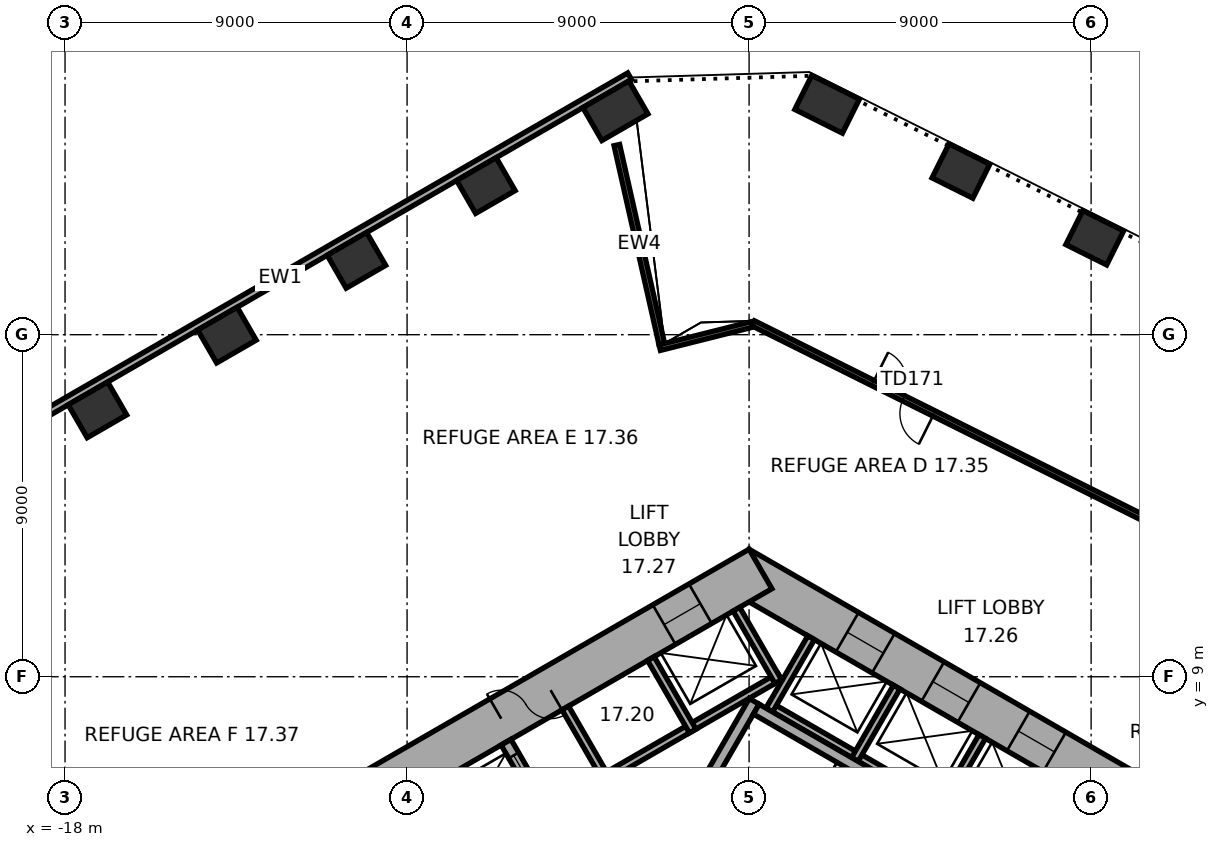
"""IFC4 building model, lengths in metres.
Left out: names, types, materials, properties, quantities, classifications, styles, units other than length and angle.
Written with IfcOpenShell. Run it as: python <this file> out.ifc"""

import sys

from ifc_helpers import new_model, si_unit, direction, frame, frame_2d, origin, origin_2d, place, context, subcontext, project, spatial, rectangle, extrude, element, fill, save


model = new_model("IFC4")
c1 = context("Model", 3, precision=1e-05, world=origin(), true_north=direction((0.0, 1.0)))
c2 = subcontext(c1, "Body", "Model", "MODEL_VIEW")
j1 = project(units=[si_unit("LENGTHUNIT", "METRE"), si_unit("PLANEANGLEUNIT", "RADIAN")], contexts=[c1])
p1 = place(None, origin())
s1 = spatial("IfcSite", under=j1, at=p1, CompositionType="ELEMENT")
p2 = place(p1, origin())
s2 = spatial("IfcBuilding", under=s1, at=p2, CompositionType="ELEMENT")
p3 = place(p2, frame((0.0, 0.0, 77.0)))
s3 = spatial("IfcBuildingStorey", under=s2, at=p3, CompositionType="ELEMENT", Elevation=77.0)
for number, where, z_axis, x_axis in (
    (1, (9.095, 20.551, 0.0), (0.0, 0.0, 1.0), (-0.895, 0.446, 0.0)),
    (2, (5.574, 22.306, 0.0), (0.0, 0.0, 1.0), (-0.895, 0.446, 0.0)),
):
    element("IfcColumn", number, at=place(p3, frame(where, z_axis=z_axis, x_axis=x_axis)), inside=s3, PredefinedType="COLUMN", context=c2, shape_type="SweptSolid", body=[
        extrude(rectangle(XDim=1.2, YDim=1.0, at=origin_2d()), origin(), (0.0, 0.0, 1.0), 6.6),
    ])
for number, where, z_axis, x_axis in (
    (3, (2.053, 24.062, 0.0), (0.0, 0.0, 1.0), (-0.895, 0.446, 0.0)),
    (4, (-3.518, 23.892, 0.0), (0.0, 0.0, 1.0), (-0.866, -0.5, 0.0)),
):
    element("IfcColumn", number, at=place(p3, frame(where, z_axis=z_axis, x_axis=x_axis)), inside=s3, PredefinedType="COLUMN", context=c2, shape_type="SweptSolid", body=[
        extrude(rectangle(XDim=1.4, YDim=1.0, at=origin_2d()), origin(), (0.0, 0.0, 1.0), 6.6),
    ])
for number, where, z_axis, x_axis in (
    (5, (-6.926, 21.925, 0.0), (0.0, 0.0, 1.0), (-0.866, -0.5, 0.0)),
    (6, (-10.333, 19.957, 0.0), (0.0, 0.0, 1.0), (-0.866, -0.5, 0.0)),
    (7, (-13.74, 17.99, 0.0), (0.0, 0.0, 1.0), (-0.866, -0.5, 0.0)),
    (8, (-17.148, 16.023, 0.0), (0.0, 0.0, 1.0), (-0.866, -0.5, 0.0)),
):
    element("IfcColumn", number, at=place(p3, frame(where, z_axis=z_axis, x_axis=x_axis)), inside=s3, PredefinedType="COLUMN", context=c2, shape_type="SweptSolid", body=[
        extrude(rectangle(XDim=1.2, YDim=1.0, at=origin_2d()), origin(), (0.0, 0.0, 1.0), 6.6),
    ])
p4 = place(p3, frame((10.4, 5.658, 0.0), z_axis=(0.0, 0.0, 1.0), x_axis=(-0.866021384402, 0.500006961711, 0.0)))
e9 = element("IfcWall", 9, at=p4, inside=s3, PredefinedType="SHEAR", context=c2, shape_type="SweptSolid", body=[
    extrude(rectangle(XDim=12.355, YDim=1.2, at=frame_2d((6.178, 0.0))), origin(), (0.0, 0.0, 1.0), 6.6),
])
p5 = place(p4, frame((2.728, 0.0, 0.0)))
e10 = element("IfcOpeningElement", 10, at=p5, cuts=e9, PredefinedType="OPENING", context=c2, shape_type="SweptSolid", body=[
    extrude(rectangle(XDim=1.1, YDim=2.1, at=frame_2d((0.55, 1.05))), frame((0.0, 0.61, 0.0), z_axis=(0.0, -1.0, 0.0), x_axis=(1.0, 0.0, 0.0)), (0.0, 0.0, 1.0), 1.22),
])
p6 = place(p4, frame((5.328, 0.0, 0.0)))
e11 = element("IfcOpeningElement", 11, at=p6, cuts=e9, PredefinedType="OPENING", context=c2, shape_type="SweptSolid", body=[
    extrude(rectangle(XDim=1.1, YDim=2.1, at=frame_2d((0.55, 1.05))), frame((0.0, 0.61, 0.0), z_axis=(0.0, -1.0, 0.0), x_axis=(1.0, 0.0, 0.0)), (0.0, 0.0, 1.0), 1.22),
])
p7 = place(p4, frame((7.928, 0.0, 0.0)))
e12 = element("IfcOpeningElement", 12, at=p7, cuts=e9, PredefinedType="OPENING", context=c2, shape_type="SweptSolid", body=[
    extrude(rectangle(XDim=1.1, YDim=2.1, at=frame_2d((0.55, 1.05))), frame((0.0, 0.61, 0.0), z_axis=(0.0, -1.0, 0.0), x_axis=(1.0, 0.0, 0.0)), (0.0, 0.0, 1.0), 1.22),
])
p8 = place(p3, frame((0.3, 11.836, 0.0), z_axis=(0.0, 0.0, 1.0), x_axis=(-0.866021384402, -0.500006961711, 0.0)))
e13 = element("IfcWall", 13, at=p8, inside=s3, PredefinedType="SHEAR", context=c2, shape_type="SweptSolid", body=[
    extrude(rectangle(XDim=12.355, YDim=1.2, at=frame_2d((6.178, 0.0))), origin(), (0.0, 0.0, 1.0), 6.6),
])
p9 = place(p8, frame((6.378, 0.0, 0.0)))
e14 = element("IfcOpeningElement", 14, at=p9, cuts=e13, PredefinedType="OPENING", context=c2, shape_type="SweptSolid", body=[
    extrude(rectangle(XDim=1.5, YDim=2.1, at=frame_2d((0.75, 1.05))), frame((0.0, 0.61, 0.0), z_axis=(0.0, -1.0, 0.0), x_axis=(1.0, 0.0, 0.0)), (0.0, 0.0, 1.0), 1.22),
])
p10 = place(p8, frame((1.828, 0.0, 0.0)))
e15 = element("IfcOpeningElement", 15, at=p10, cuts=e13, PredefinedType="OPENING", context=c2, shape_type="SweptSolid", body=[
    extrude(rectangle(XDim=1.1, YDim=2.1, at=frame_2d((0.55, 1.05))), frame((0.0, 0.61, 0.0), z_axis=(0.0, -1.0, 0.0), x_axis=(1.0, 0.0, 0.0)), (0.0, 0.0, 1.0), 1.22),
])
p11 = place(p3, frame((-3.144, 24.801, 0.0), z_axis=(0.0, 0.0, 1.0), x_axis=(-0.866028031259, -0.499995449053, 0.0)))
e16 = element("IfcWall", 16, at=p11, inside=s3, PredefinedType="STANDARD", context=c2, shape_type="SweptSolid", body=[
    extrude(rectangle(XDim=21.237, YDim=0.2, at=frame_2d((10.619, 0.0))), origin(), (0.0, 0.0, 1.0), 6.6),
])
p12 = place(p3, frame((-3.481, 22.99, 0.0), z_axis=(0.0, 0.0, 1.0), x_axis=(0.220457909633, -0.975396488655, 0.0)))
e17 = element("IfcWall", 17, at=p12, inside=s3, PredefinedType="STANDARD", context=c2, shape_type="SweptSolid", body=[
    extrude(rectangle(XDim=5.362, YDim=0.15, at=frame_2d((2.681, 0.0))), origin(), (0.0, 0.0, 1.0), 2.6),
])
p13 = place(p3, frame((-2.351, 17.659, 0.0), z_axis=(0.0, 0.0, 1.0), x_axis=(0.969814051176, 0.243845660495, 0.0)))
e18 = element("IfcWall", 18, at=p13, inside=s3, PredefinedType="STANDARD", context=c2, shape_type="SweptSolid", body=[
    extrude(rectangle(XDim=2.499, YDim=0.15, at=frame_2d((1.25, 0.0))), origin(), (0.0, 0.0, 1.0), 2.6),
])
p14 = place(p3, frame((0.113, 18.297, 0.0), z_axis=(0.0, 0.0, 1.0), x_axis=(0.894932628477, -0.446201289204, 0.0)))
e19 = element("IfcWall", 19, at=p14, inside=s3, PredefinedType="STANDARD", context=c2, shape_type="SweptSolid", body=[
    extrude(rectangle(XDim=17.659, YDim=0.15, at=frame_2d((8.83, 0.0))), origin(), (0.0, 0.0, 1.0), 2.6),
])
p15 = place(p14, frame((3.515, 0.0, 0.0)))
e20 = element("IfcOpeningElement", 20, at=p15, cuts=e19, PredefinedType="OPENING", context=c2, shape_type="SweptSolid", body=[
    extrude(rectangle(XDim=1.8, YDim=2.4, at=frame_2d((0.9, 1.2))), frame((0.0, 0.085, 0.0), z_axis=(0.0, -1.0, 0.0), x_axis=(1.0, 0.0, 0.0)), (0.0, 0.0, 1.0), 0.17),
])
p16 = place(p14, frame((12.344, 0.0, 0.0)))
e21 = element("IfcOpeningElement", 21, at=p16, cuts=e19, PredefinedType="OPENING", context=c2, shape_type="SweptSolid", body=[
    extrude(rectangle(XDim=1.8, YDim=2.4, at=frame_2d((0.9, 1.2))), frame((0.0, 0.085, 0.0), z_axis=(0.0, -1.0, 0.0), x_axis=(1.0, 0.0, 0.0)), (0.0, 0.0, 1.0), 0.17),
])
p17 = place(p3, frame((7.424, 4.259, 0.0), z_axis=(0.0, 0.0, 1.0), x_axis=(-0.866026010844, 0.49999894854, 0.0)))
e22 = element("IfcWall", 22, at=p17, inside=s3, PredefinedType="PARTITIONING", context=c2, shape_type="SweptSolid", body=[
    extrude(rectangle(XDim=8.0, YDim=0.2, at=frame_2d((4.0, 0.0))), origin(), (0.0, 0.0, 1.0), 6.35),
])
for number, where, z_axis, x_axis in (
    (23, (5.036, 5.522, 0.0), (0.0, 0.0, 1.0), (0.5, 0.866, 0.0)),
    (24, (2.784, 6.822, 0.0), (0.0, 0.0, 1.0), (0.5, 0.866, 0.0)),
    (25, (0.532, 8.122, 0.0), (0.0, 0.0, 1.0), (0.5, 0.866, 0.0)),
):
    element("IfcWall", number, at=place(p3, frame(where, z_axis=z_axis, x_axis=x_axis)), inside=s3, PredefinedType="PARTITIONING", context=c2, shape_type="SweptSolid", body=[
        extrude(rectangle(XDim=2.2, YDim=0.2, at=frame_2d((1.1, 0.0))), origin(), (0.0, 0.0, 1.0), 6.35),
    ])
p18 = place(p3, frame((0.803, 9.009, 0.0), z_axis=(0.0, 0.0, 1.0), x_axis=(-0.866028230842, -0.499995103361, 0.0)))
e26 = element("IfcWall", 26, at=p18, inside=s3, PredefinedType="PARTITIONING", context=c2, shape_type="SweptSolid", body=[
    extrude(rectangle(XDim=5.4, YDim=0.2, at=frame_2d((2.7, 0.0))), origin(), (0.0, 0.0, 1.0), 6.35),
])
p19 = place(p3, frame((0.767, 8.872, 0.0), z_axis=(0.0, 0.0, 1.0), x_axis=(-0.499994660107, 0.866028486751, 0.0)))
e27 = element("IfcWall", 27, at=p19, inside=s3, PredefinedType="PARTITIONING", context=c2, shape_type="SweptSolid", body=[
    extrude(rectangle(XDim=2.2, YDim=0.2, at=frame_2d((1.1, 0.0))), origin(), (0.0, 0.0, 1.0), 6.35),
])
for number, where, z_axis, x_axis in (
    (28, (-1.485, 7.572, 0.0), (0.0, 0.0, 1.0), (-0.5, 0.866, 0.0)),
    (29, (-3.737, 6.272, 0.0), (0.0, 0.0, 1.0), (-0.5, 0.866, 0.0)),
):
    element("IfcWall", number, at=place(p3, frame(where, z_axis=z_axis, x_axis=x_axis)), inside=s3, PredefinedType="PARTITIONING", context=c2, shape_type="SweptSolid", body=[
        extrude(rectangle(XDim=2.2, YDim=0.2, at=frame_2d((1.1, 0.0))), origin(), (0.0, 0.0, 1.0), 6.35),
    ])
p20 = place(p3, frame((-2.216, 4.282, 0.0), z_axis=(0.0, 0.0, 1.0), x_axis=(0.499977259774, 0.866038532462, 0.0)))
e30 = element("IfcWall", 30, at=p20, inside=s3, PredefinedType="SHEAR", context=c2, shape_type="SweptSolid", body=[
    extrude(rectangle(XDim=4.7, YDim=0.3, at=frame_2d((2.35, 0.0))), origin(), (0.0, 0.0, 1.0), 6.35),
])
p21 = place(p3, frame((6.303, 4.617, 0.0), z_axis=(0.0, 0.0, 1.0), x_axis=(-0.866027801685, 0.499995846692, 0.0)))
e31 = element("IfcWall", 31, at=p21, inside=s3, PredefinedType="SHEAR", context=c2, shape_type="SweptSolid", body=[
    extrude(rectangle(XDim=7.06, YDim=0.3, at=frame_2d((3.53, 0.0))), origin(), (0.0, 0.0, 1.0), 6.35),
])
p22 = place(p3, frame((-5.295, 5.372, 0.0), z_axis=(0.0, 0.0, 1.0), x_axis=(-0.500077893725, 0.86598042715, 0.0)))
e32 = element("IfcWall", 32, at=p22, inside=s3, PredefinedType="SHEAR", context=c2, shape_type="SweptSolid", body=[
    extrude(rectangle(XDim=2.2, YDim=0.3, at=frame_2d((1.1, 0.0))), origin(), (0.0, 0.0, 1.0), 6.35),
])
p23 = place(p22, frame((0.7, 0.0, 0.0)))
e33 = element("IfcOpeningElement", 33, at=p23, cuts=e32, PredefinedType="OPENING", context=c2, shape_type="SweptSolid", body=[
    extrude(rectangle(XDim=1.1, YDim=2.1, at=frame_2d((0.55, 1.05))), frame((0.0, 0.16, 0.0), z_axis=(0.0, -1.0, 0.0), x_axis=(1.0, 0.0, 0.0)), (0.0, 0.0, 1.0), 0.32),
])
p24 = place(p15, origin())
e34 = element("IfcDoor", 34, at=p24, inside=s3, OperationType="DOUBLE_DOOR_DOUBLE_SWING", PredefinedType="DOOR", context=c2, shape_type="SweptSolid", body=[
    extrude(rectangle(XDim=1.8, YDim=2.4, at=frame_2d((0.9, 1.2))), frame((0.0, 0.025, 0.0), z_axis=(0.0, -1.0, 0.0), x_axis=(1.0, 0.0, 0.0)), (0.0, 0.0, 1.0), 0.05),
])
fill(e20, e34)
p25 = place(p9, origin())
e35 = element("IfcDoor", 35, at=p25, inside=s3, OperationType="DOUBLE_DOOR_SINGLE_SWING", PredefinedType="DOOR", context=c2, shape_type="SweptSolid", body=[
    extrude(rectangle(XDim=1.5, YDim=2.1, at=frame_2d((0.75, 1.05))), frame((0.0, 0.025, 0.0), z_axis=(0.0, -1.0, 0.0), x_axis=(1.0, 0.0, 0.0)), (0.0, 0.0, 1.0), 0.05),
])
fill(e14, e35)
p26 = place(p23, origin())
e36 = element("IfcDoor", 36, at=p26, inside=s3, OperationType="DOUBLE_DOOR_SLIDING", PredefinedType="DOOR", context=c2, shape_type="SweptSolid", body=[
    extrude(rectangle(XDim=1.1, YDim=2.1, at=frame_2d((0.55, 1.05))), frame((0.0, 0.025, 0.0), z_axis=(0.0, -1.0, 0.0), x_axis=(1.0, 0.0, 0.0)), (0.0, 0.0, 1.0), 0.05),
])
fill(e33, e36)
p27 = place(p5, origin())
e37 = element("IfcDoor", 37, at=p27, inside=s3, OperationType="DOUBLE_DOOR_SLIDING", PredefinedType="DOOR", context=c2, shape_type="SweptSolid", body=[
    extrude(rectangle(XDim=1.1, YDim=2.1, at=frame_2d((0.55, 1.05))), frame((0.0, 0.025, 0.0), z_axis=(0.0, -1.0, 0.0), x_axis=(1.0, 0.0, 0.0)), (0.0, 0.0, 1.0), 0.05),
])
fill(e10, e37)
p28 = place(p6, origin())
e38 = element("IfcDoor", 38, at=p28, inside=s3, OperationType="DOUBLE_DOOR_SLIDING", PredefinedType="DOOR", context=c2, shape_type="SweptSolid", body=[
    extrude(rectangle(XDim=1.1, YDim=2.1, at=frame_2d((0.55, 1.05))), frame((0.0, 0.025, 0.0), z_axis=(0.0, -1.0, 0.0), x_axis=(1.0, 0.0, 0.0)), (0.0, 0.0, 1.0), 0.05),
])
fill(e11, e38)
p29 = place(p7, origin())
e39 = element("IfcDoor", 39, at=p29, inside=s3, OperationType="DOUBLE_DOOR_SLIDING", PredefinedType="DOOR", context=c2, shape_type="SweptSolid", body=[
    extrude(rectangle(XDim=1.1, YDim=2.1, at=frame_2d((0.55, 1.05))), frame((0.0, 0.025, 0.0), z_axis=(0.0, -1.0, 0.0), x_axis=(1.0, 0.0, 0.0)), (0.0, 0.0, 1.0), 0.05),
])
fill(e12, e39)
p30 = place(p10, origin())
e40 = element("IfcDoor", 40, at=p30, inside=s3, OperationType="DOUBLE_DOOR_SLIDING", PredefinedType="DOOR", context=c2, shape_type="SweptSolid", body=[
    extrude(rectangle(XDim=1.1, YDim=2.1, at=frame_2d((0.55, 1.05))), frame((0.0, 0.025, 0.0), z_axis=(0.0, -1.0, 0.0), x_axis=(1.0, 0.0, 0.0)), (0.0, 0.0, 1.0), 0.05),
])
fill(e15, e40)
save(model, sys.argv[1])
